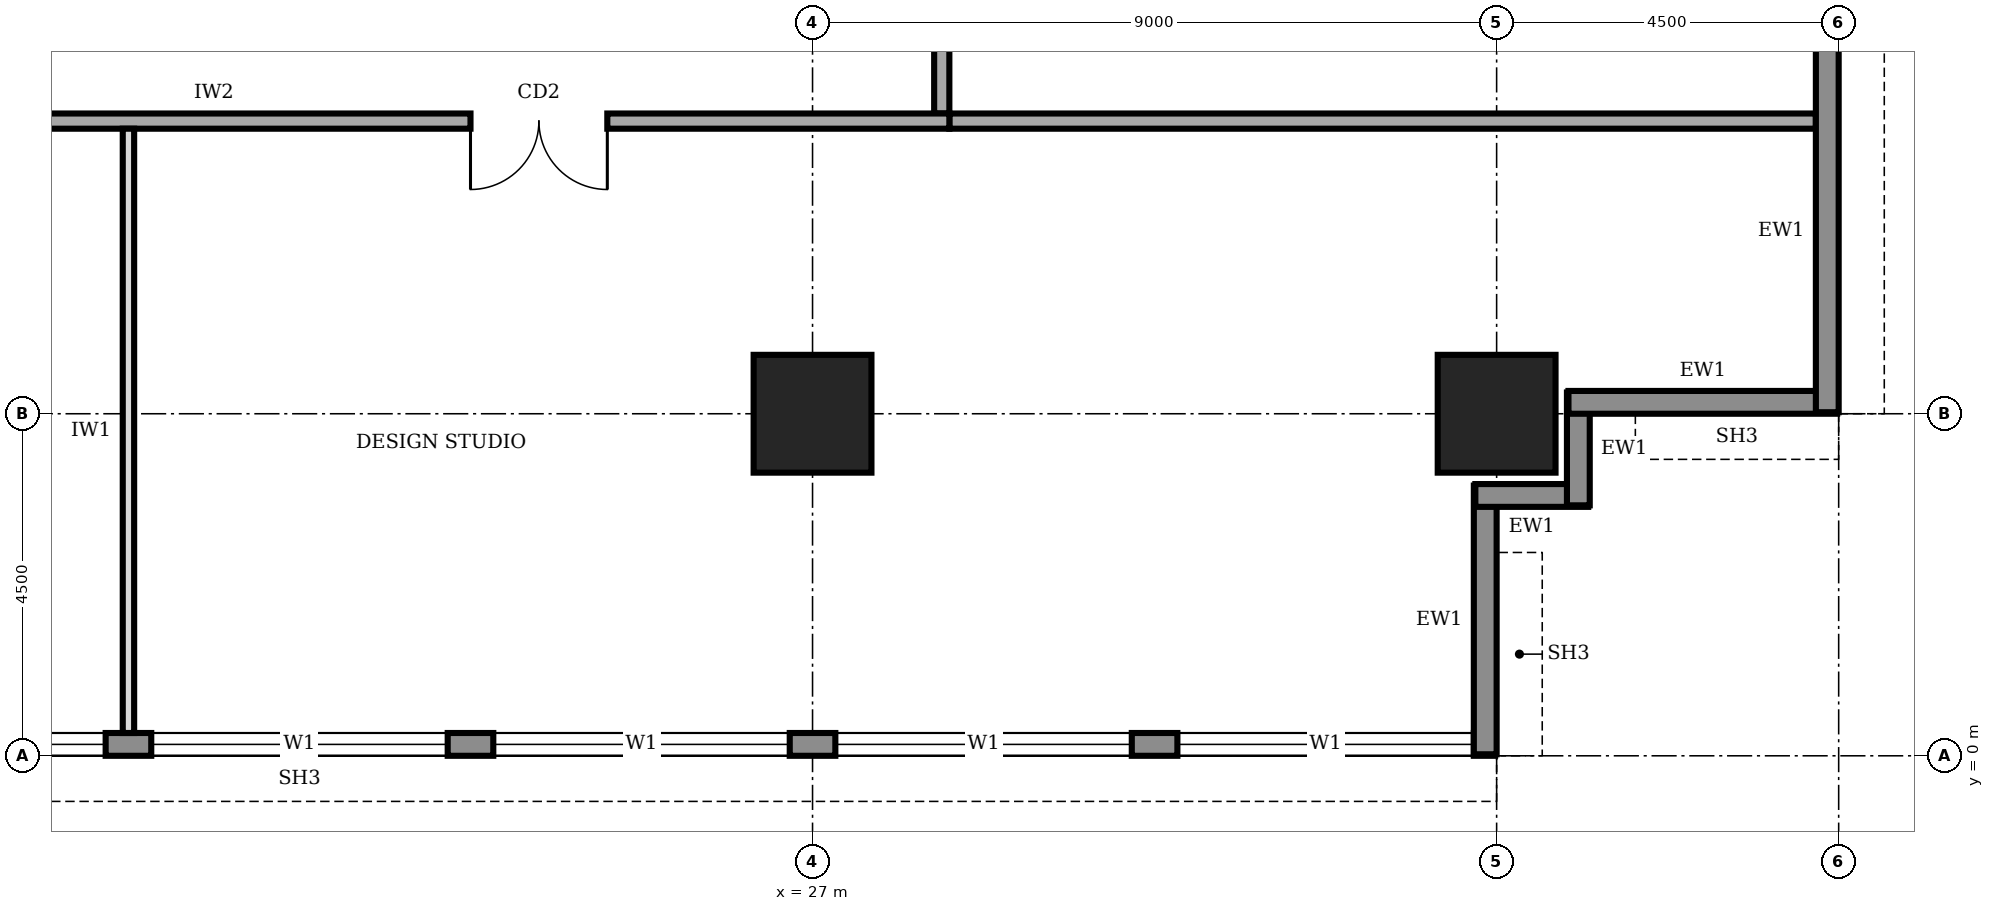
"""IFC4 building model, lengths in metres.
Left out: names, types, materials, properties, quantities, classifications, styles, units other than length and angle.
Written with IfcOpenShell. Run it as: python <this file> out.ifc"""

import sys

from ifc_helpers import new_model, si_unit, direction, frame, frame_2d, origin, origin_2d, place, context, subcontext, project, spatial, rectangle, extrude, element, fill, save


model = new_model("IFC4")
c1 = context("Model", 3, precision=1e-05, world=origin(), true_north=direction((0.0, 1.0)))
c2 = subcontext(c1, "Body", "Model", "MODEL_VIEW")
j1 = project(units=[si_unit("LENGTHUNIT", "METRE"), si_unit("PLANEANGLEUNIT", "RADIAN")], contexts=[c1])
p1 = place(None, origin())
s1 = spatial("IfcSite", under=j1, at=p1, CompositionType="ELEMENT")
p2 = place(p1, origin())
s2 = spatial("IfcBuilding", under=s1, at=p2, CompositionType="ELEMENT")
p3 = place(p2, frame((0.0, 0.0, 221.0)))
s3 = spatial("IfcBuildingStorey", under=s2, at=p3, CompositionType="ELEMENT", Elevation=221.0)
for number, where, z_axis, x_axis in (
    (1, (27.0, 4.5, 0.0), (0.0, 0.0, 1.0), (1.0, 0.0, 0.0)),
    (2, (36.0, 4.5, 0.0), (0.0, 0.0, 1.0), (1.0, 0.0, 0.0)),
):
    element("IfcColumn", number, at=place(p3, frame(where, z_axis=z_axis, x_axis=x_axis)), inside=s3, PredefinedType="COLUMN", context=c2, shape_type="SweptSolid", body=[
        extrude(rectangle(XDim=1.55, YDim=1.55, at=origin_2d()), origin(), (0.0, 0.0, 1.0), 4.0),
    ])
p4 = place(p3, frame((4.52, 0.15, 0.0), z_axis=(0.0, 0.0, 1.0), x_axis=(1.0, 0.0, 0.0)))
e3 = element("IfcWall", 3, at=p4, inside=s3, PredefinedType="STANDARD", context=c2, shape_type="SweptSolid", body=[
    extrude(rectangle(XDim=31.46, YDim=0.3, at=frame_2d((15.73, 0.0))), origin(), (0.0, 0.0, 1.0), 3.75),
])
p5 = place(p4, frame((4.78, 0.0, 0.9)))
e4 = element("IfcOpeningElement", 4, at=p5, cuts=e3, PredefinedType="OPENING", context=c2, shape_type="SweptSolid", body=[
    extrude(rectangle(XDim=3.9, YDim=2.2, at=frame_2d((1.95, 1.1))), frame((0.0, 0.16, 0.0), z_axis=(0.0, -1.0, 0.0), x_axis=(1.0, 0.0, 0.0)), (0.0, 0.0, 1.0), 0.32),
])
p6 = place(p4, frame((9.28, 0.0, 0.9)))
e5 = element("IfcOpeningElement", 5, at=p6, cuts=e3, PredefinedType="OPENING", context=c2, shape_type="SweptSolid", body=[
    extrude(rectangle(XDim=3.9, YDim=2.2, at=frame_2d((1.95, 1.1))), frame((0.0, 0.16, 0.0), z_axis=(0.0, -1.0, 0.0), x_axis=(1.0, 0.0, 0.0)), (0.0, 0.0, 1.0), 0.32),
])
p7 = place(p4, frame((13.78, 0.0, 0.9)))
e6 = element("IfcOpeningElement", 6, at=p7, cuts=e3, PredefinedType="OPENING", context=c2, shape_type="SweptSolid", body=[
    extrude(rectangle(XDim=3.9, YDim=2.2, at=frame_2d((1.95, 1.1))), frame((0.0, 0.16, 0.0), z_axis=(0.0, -1.0, 0.0), x_axis=(1.0, 0.0, 0.0)), (0.0, 0.0, 1.0), 0.32),
])
p8 = place(p4, frame((18.28, 0.0, 0.9)))
e7 = element("IfcOpeningElement", 7, at=p8, cuts=e3, PredefinedType="OPENING", context=c2, shape_type="SweptSolid", body=[
    extrude(rectangle(XDim=3.9, YDim=2.2, at=frame_2d((1.95, 1.1))), frame((0.0, 0.16, 0.0), z_axis=(0.0, -1.0, 0.0), x_axis=(1.0, 0.0, 0.0)), (0.0, 0.0, 1.0), 0.32),
])
p9 = place(p4, frame((22.78, 0.0, 0.9)))
e8 = element("IfcOpeningElement", 8, at=p9, cuts=e3, PredefinedType="OPENING", context=c2, shape_type="SweptSolid", body=[
    extrude(rectangle(XDim=3.9, YDim=2.2, at=frame_2d((1.95, 1.1))), frame((0.0, 0.16, 0.0), z_axis=(0.0, -1.0, 0.0), x_axis=(1.0, 0.0, 0.0)), (0.0, 0.0, 1.0), 0.32),
])
p10 = place(p4, frame((27.28, 0.0, 0.9)))
e9 = element("IfcOpeningElement", 9, at=p10, cuts=e3, PredefinedType="OPENING", context=c2, shape_type="SweptSolid", body=[
    extrude(rectangle(XDim=3.9, YDim=2.2, at=frame_2d((1.95, 1.1))), frame((0.0, 0.16, 0.0), z_axis=(0.0, -1.0, 0.0), x_axis=(1.0, 0.0, 0.0)), (0.0, 0.0, 1.0), 0.32),
])
p11 = place(p3, frame((35.85, 0.02, 0.0), z_axis=(0.0, 0.0, 1.0), x_axis=(0.0, 1.0, 0.0)))
e10 = element("IfcWall", 10, at=p11, inside=s3, PredefinedType="STANDARD", context=c2, shape_type="SweptSolid", body=[
    extrude(rectangle(XDim=3.535, YDim=0.3, at=frame_2d((1.768, 0.0))), origin(), (0.0, 0.0, 1.0), 2.85),
])
for number, where, z_axis, x_axis in (
    (11, (35.72, 3.425, 0.0), (0.0, 0.0, 1.0), (1.0, 0.0, 0.0)),
    (12, (37.075, 3.295, 0.0), (0.0, 0.0, 1.0), (0.0, 1.0, 0.0)),
):
    element("IfcWall", number, at=place(p3, frame(where, z_axis=z_axis, x_axis=x_axis)), inside=s3, PredefinedType="STANDARD", context=c2, shape_type="SweptSolid", body=[
        extrude(rectangle(XDim=1.485, YDim=0.3, at=frame_2d((0.743, 0.0))), origin(), (0.0, 0.0, 1.0), 3.75),
    ])
p12 = place(p3, frame((36.945, 4.65, 0.0), z_axis=(0.0, 0.0, 1.0), x_axis=(1.0, 0.0, 0.0)))
e13 = element("IfcWall", 13, at=p12, inside=s3, PredefinedType="STANDARD", context=c2, shape_type="SweptSolid", body=[
    extrude(rectangle(XDim=3.535, YDim=0.3, at=frame_2d((1.768, 0.0))), origin(), (0.0, 0.0, 1.0), 2.85),
])
p13 = place(p3, frame((40.35, 4.52, 0.0), z_axis=(0.0, 0.0, 1.0), x_axis=(0.0, 1.0, 0.0)))
e14 = element("IfcWall", 14, at=p13, inside=s3, PredefinedType="STANDARD", context=c2, shape_type="SweptSolid", body=[
    extrude(rectangle(XDim=31.46, YDim=0.3, at=frame_2d((15.73, 0.0))), origin(), (0.0, 0.0, 1.0), 3.75),
])
p14 = place(p13, frame((4.78, 0.0, 0.9)))
e15 = element("IfcOpeningElement", 15, at=p14, cuts=e14, PredefinedType="OPENING", context=c2, shape_type="SweptSolid", body=[
    extrude(rectangle(XDim=3.9, YDim=2.2, at=frame_2d((1.95, 1.1))), frame((0.0, 0.16, 0.0), z_axis=(0.0, -1.0, 0.0), x_axis=(1.0, 0.0, 0.0)), (0.0, 0.0, 1.0), 0.32),
])
p15 = place(p13, frame((9.28, 0.0, 0.9)))
e16 = element("IfcOpeningElement", 16, at=p15, cuts=e14, PredefinedType="OPENING", context=c2, shape_type="SweptSolid", body=[
    extrude(rectangle(XDim=3.9, YDim=2.2, at=frame_2d((1.95, 1.1))), frame((0.0, 0.16, 0.0), z_axis=(0.0, -1.0, 0.0), x_axis=(1.0, 0.0, 0.0)), (0.0, 0.0, 1.0), 0.32),
])
p16 = place(p13, frame((13.78, 0.0, 0.9)))
e17 = element("IfcOpeningElement", 17, at=p16, cuts=e14, PredefinedType="OPENING", context=c2, shape_type="SweptSolid", body=[
    extrude(rectangle(XDim=3.9, YDim=2.2, at=frame_2d((1.95, 1.1))), frame((0.0, 0.16, 0.0), z_axis=(0.0, -1.0, 0.0), x_axis=(1.0, 0.0, 0.0)), (0.0, 0.0, 1.0), 0.32),
])
p17 = place(p13, frame((18.28, 0.0, 0.9)))
e18 = element("IfcOpeningElement", 18, at=p17, cuts=e14, PredefinedType="OPENING", context=c2, shape_type="SweptSolid", body=[
    extrude(rectangle(XDim=3.9, YDim=2.2, at=frame_2d((1.95, 1.1))), frame((0.0, 0.16, 0.0), z_axis=(0.0, -1.0, 0.0), x_axis=(1.0, 0.0, 0.0)), (0.0, 0.0, 1.0), 0.32),
])
p18 = place(p13, frame((22.78, 0.0, 0.9)))
e19 = element("IfcOpeningElement", 19, at=p18, cuts=e14, PredefinedType="OPENING", context=c2, shape_type="SweptSolid", body=[
    extrude(rectangle(XDim=3.9, YDim=2.2, at=frame_2d((1.95, 1.1))), frame((0.0, 0.16, 0.0), z_axis=(0.0, -1.0, 0.0), x_axis=(1.0, 0.0, 0.0)), (0.0, 0.0, 1.0), 0.32),
])
p19 = place(p13, frame((27.28, 0.0, 0.9)))
e20 = element("IfcOpeningElement", 20, at=p19, cuts=e14, PredefinedType="OPENING", context=c2, shape_type="SweptSolid", body=[
    extrude(rectangle(XDim=3.9, YDim=2.2, at=frame_2d((1.95, 1.1))), frame((0.0, 0.16, 0.0), z_axis=(0.0, -1.0, 0.0), x_axis=(1.0, 0.0, 0.0)), (0.0, 0.0, 1.0), 0.32),
])
p20 = place(p3, frame((11.9, 8.35, 0.0), z_axis=(0.0, 0.0, 1.0), x_axis=(1.0, 0.0, 0.0)))
e21 = element("IfcWall", 21, at=p20, inside=s3, PredefinedType="SOLIDWALL", context=c2, shape_type="SweptSolid", body=[
    extrude(rectangle(XDim=16.9, YDim=0.2, at=frame_2d((8.45, 0.0))), origin(), (0.0, 0.0, 1.0), 3.75),
])
p21 = place(p20, frame((2.05, 0.0, 0.0)))
e22 = element("IfcOpeningElement", 22, at=p21, cuts=e21, PredefinedType="OPENING", context=c2, shape_type="SweptSolid", body=[
    extrude(rectangle(XDim=1.8, YDim=2.1, at=frame_2d((0.9, 1.05))), frame((0.0, 0.11, 0.0), z_axis=(0.0, -1.0, 0.0), x_axis=(1.0, 0.0, 0.0)), (0.0, 0.0, 1.0), 0.22),
])
p22 = place(p20, frame((10.6, 0.0, 0.0)))
e23 = element("IfcOpeningElement", 23, at=p22, cuts=e21, PredefinedType="OPENING", context=c2, shape_type="SweptSolid", body=[
    extrude(rectangle(XDim=1.8, YDim=2.1, at=frame_2d((0.9, 1.05))), frame((0.0, 0.11, 0.0), z_axis=(0.0, -1.0, 0.0), x_axis=(1.0, 0.0, 0.0)), (0.0, 0.0, 1.0), 0.22),
])
p23 = place(p3, frame((28.7, 8.45, 0.0), z_axis=(0.0, 0.0, 1.0), x_axis=(0.0, 1.0, 0.0)))
e24 = element("IfcWall", 24, at=p23, inside=s3, PredefinedType="SOLIDWALL", context=c2, shape_type="SweptSolid", body=[
    extrude(rectangle(XDim=23.8, YDim=0.2, at=frame_2d((11.9, 0.0))), origin(), (0.0, 0.0, 1.0), 3.75),
])
p24 = place(p23, frame((3.775, 0.0, 0.0)))
e25 = element("IfcOpeningElement", 25, at=p24, cuts=e24, PredefinedType="OPENING", context=c2, shape_type="SweptSolid", body=[
    extrude(rectangle(XDim=1.8, YDim=2.1, at=frame_2d((0.9, 1.05))), frame((0.0, 0.11, 0.0), z_axis=(0.0, -1.0, 0.0), x_axis=(1.0, 0.0, 0.0)), (0.0, 0.0, 1.0), 0.22),
])
p25 = place(p23, frame((11.3, 0.0, 0.0)))
e26 = element("IfcOpeningElement", 26, at=p25, cuts=e24, PredefinedType="OPENING", context=c2, shape_type="SweptSolid", body=[
    extrude(rectangle(XDim=1.0, YDim=2.1, at=frame_2d((0.5, 1.05))), frame((0.0, 0.11, 0.0), z_axis=(0.0, -1.0, 0.0), x_axis=(1.0, 0.0, 0.0)), (0.0, 0.0, 1.0), 0.22),
])
p26 = place(p23, frame((18.025, 0.0, 0.0)))
e27 = element("IfcOpeningElement", 27, at=p26, cuts=e24, PredefinedType="OPENING", context=c2, shape_type="SweptSolid", body=[
    extrude(rectangle(XDim=1.8, YDim=2.1, at=frame_2d((0.9, 1.05))), frame((0.0, 0.11, 0.0), z_axis=(0.0, -1.0, 0.0), x_axis=(1.0, 0.0, 0.0)), (0.0, 0.0, 1.0), 0.22),
])
p27 = place(p3, frame((28.8, 8.35, 0.0), z_axis=(0.0, 0.0, 1.0), x_axis=(1.0, 0.0, 0.0)))
e28 = element("IfcWall", 28, at=p27, inside=s3, PredefinedType="SOLIDWALL", context=c2, shape_type="SweptSolid", body=[
    extrude(rectangle(XDim=11.4, YDim=0.2, at=frame_2d((5.7, 0.0))), origin(), (0.0, 0.0, 1.0), 3.75),
])
p28 = place(p3, frame((18.0, 0.3, 0.0), z_axis=(0.0, 0.0, 1.0), x_axis=(0.0, 1.0, 0.0)))
e29 = element("IfcWall", 29, at=p28, inside=s3, PredefinedType="PARTITIONING", context=c2, shape_type="SweptSolid", body=[
    extrude(rectangle(XDim=7.95, YDim=0.15, at=frame_2d((3.975, 0.0))), origin(), (0.0, 0.0, 1.0), 3.75),
])
p29 = place(p6, origin())
e30 = element("IfcWindow", 30, at=p29, inside=s3, PartitioningType="SINGLE_PANEL", PredefinedType="WINDOW", context=c2, shape_type="SweptSolid", body=[
    extrude(rectangle(XDim=3.9, YDim=2.2, at=frame_2d((1.95, 1.1))), frame((0.0, 0.03, 0.0), z_axis=(0.0, -1.0, 0.0), x_axis=(1.0, 0.0, 0.0)), (0.0, 0.0, 1.0), 0.06),
])
fill(e5, e30)
p30 = place(p7, origin())
e31 = element("IfcWindow", 31, at=p30, inside=s3, PartitioningType="SINGLE_PANEL", PredefinedType="WINDOW", context=c2, shape_type="SweptSolid", body=[
    extrude(rectangle(XDim=3.9, YDim=2.2, at=frame_2d((1.95, 1.1))), frame((0.0, 0.03, 0.0), z_axis=(0.0, -1.0, 0.0), x_axis=(1.0, 0.0, 0.0)), (0.0, 0.0, 1.0), 0.06),
])
fill(e6, e31)
p31 = place(p8, origin())
e32 = element("IfcWindow", 32, at=p31, inside=s3, PartitioningType="SINGLE_PANEL", PredefinedType="WINDOW", context=c2, shape_type="SweptSolid", body=[
    extrude(rectangle(XDim=3.9, YDim=2.2, at=frame_2d((1.95, 1.1))), frame((0.0, 0.03, 0.0), z_axis=(0.0, -1.0, 0.0), x_axis=(1.0, 0.0, 0.0)), (0.0, 0.0, 1.0), 0.06),
])
fill(e7, e32)
p32 = place(p9, origin())
e33 = element("IfcWindow", 33, at=p32, inside=s3, PartitioningType="SINGLE_PANEL", PredefinedType="WINDOW", context=c2, shape_type="SweptSolid", body=[
    extrude(rectangle(XDim=3.9, YDim=2.2, at=frame_2d((1.95, 1.1))), frame((0.0, 0.03, 0.0), z_axis=(0.0, -1.0, 0.0), x_axis=(1.0, 0.0, 0.0)), (0.0, 0.0, 1.0), 0.06),
])
fill(e8, e33)
p33 = place(p10, origin())
e34 = element("IfcWindow", 34, at=p33, inside=s3, PartitioningType="SINGLE_PANEL", PredefinedType="WINDOW", context=c2, shape_type="SweptSolid", body=[
    extrude(rectangle(XDim=3.9, YDim=2.2, at=frame_2d((1.95, 1.1))), frame((0.0, 0.03, 0.0), z_axis=(0.0, -1.0, 0.0), x_axis=(1.0, 0.0, 0.0)), (0.0, 0.0, 1.0), 0.06),
])
fill(e9, e34)
p34 = place(p22, frame((1.8, 0.0, 0.0), z_axis=(0.0, 0.0, 1.0), x_axis=(-1.0, 0.0, 0.0)))
e35 = element("IfcDoor", 35, at=p34, inside=s3, OperationType="DOUBLE_DOOR_SINGLE_SWING", PredefinedType="DOOR", context=c2, shape_type="SweptSolid", body=[
    extrude(rectangle(XDim=1.8, YDim=2.1, at=frame_2d((0.9, 1.05))), frame((0.0, 0.025, 0.0), z_axis=(0.0, -1.0, 0.0), x_axis=(1.0, 0.0, 0.0)), (0.0, 0.0, 1.0), 0.05),
])
fill(e23, e35)
save(model, sys.argv[1])
